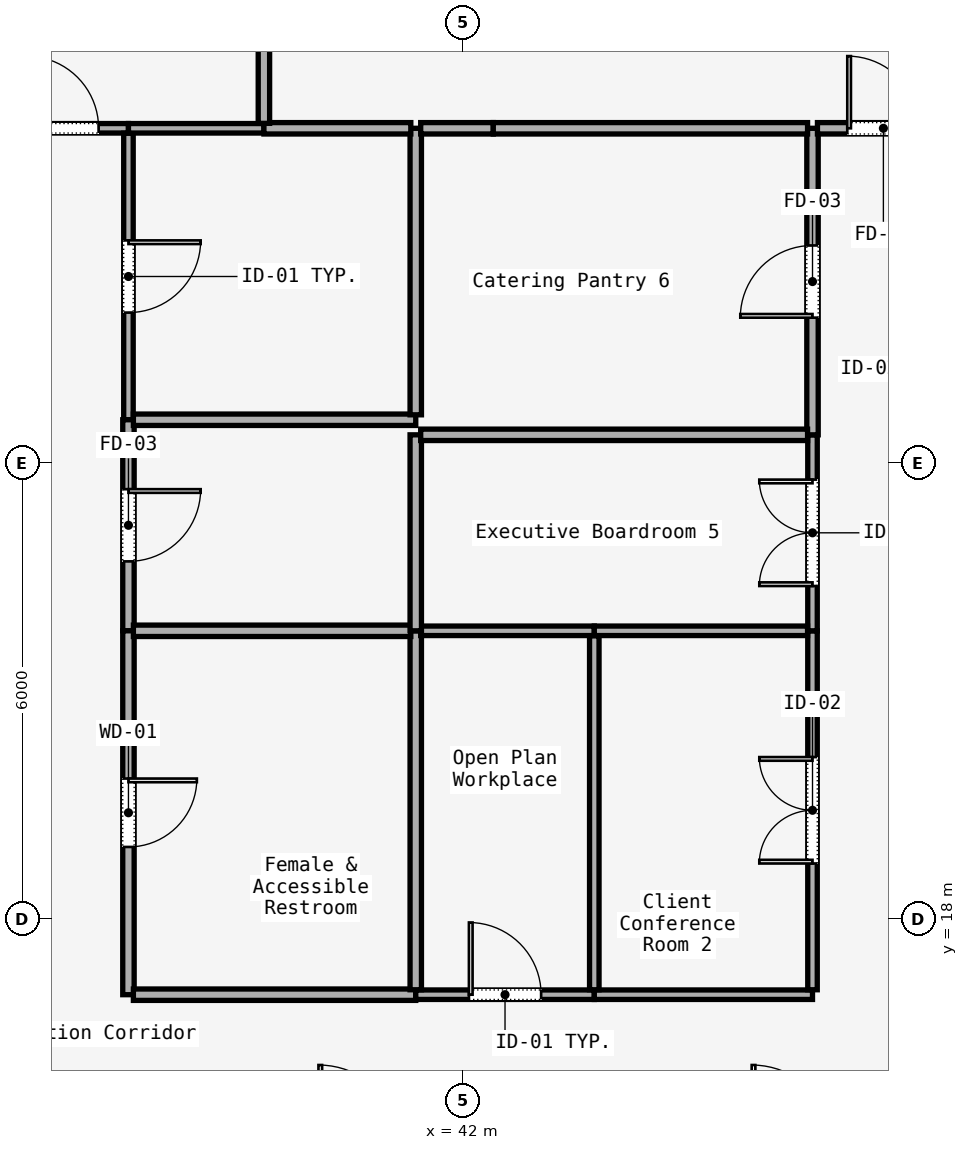
"""IFC4 building model, lengths in metres.
Left out: names, types, materials, properties, quantities, classifications, styles, units other than length and angle.
Written with IfcOpenShell. Run it as: python <this file> out.ifc"""

import sys

from ifc_helpers import new_model, si_unit, direction, frame, frame_2d, origin, place, context, subcontext, project, spatial, rectangle, extrude, element, fill, save


model = new_model("IFC4")
c1 = context("Model", 3, precision=1e-05, world=origin(), true_north=direction((0.0, 1.0)))
c2 = subcontext(c1, "Body", "Model", "MODEL_VIEW")
j1 = project(units=[si_unit("LENGTHUNIT", "METRE"), si_unit("PLANEANGLEUNIT", "RADIAN")], contexts=[c1])
p1 = place(None, origin())
s1 = spatial("IfcSite", under=j1, at=p1, CompositionType="ELEMENT")
p2 = place(p1, origin())
s2 = spatial("IfcBuilding", under=s1, at=p2, CompositionType="ELEMENT")
p3 = place(p2, frame((0.0, 0.0, 130.8)))
s3 = spatial("IfcBuildingStorey", under=s2, at=p3, CompositionType="ELEMENT", Elevation=130.8)
p4 = place(p3, frame((35.865, 28.4, 0.0), z_axis=(0.0, 0.0, 1.0), x_axis=(1.0, 0.0, 0.0)))
e1 = element("IfcWall", 1, at=p4, inside=s3, PredefinedType="PARTITIONING", context=c2, shape_type="SweptSolid", body=[
    extrude(rectangle(XDim=1.735, YDim=0.125, at=frame_2d((0.868, 0.0))), origin(), (0.0, 0.0, 1.0), 3.01),
])
p5 = place(p4, frame((0.393, 0.0, 0.0)))
e2 = element("IfcOpeningElement", 2, at=p5, cuts=e1, PredefinedType="OPENING", context=c2, shape_type="SweptSolid", body=[
    extrude(rectangle(XDim=0.95, YDim=2.2, at=frame_2d((0.475, 1.1))), frame((0.0, 0.062, 0.0), z_axis=(0.0, -1.0, 0.0), x_axis=(1.0, 0.0, 0.0)), (0.0, 0.0, 1.0), 0.125),
])
p6 = place(p3, frame((37.6, 28.335, 0.0), z_axis=(0.0, 0.0, 1.0), x_axis=(0.0, -1.0, 0.0)))
e3 = element("IfcWall", 3, at=p6, inside=s3, PredefinedType="PARTITIONING", context=c2, shape_type="SweptSolid", body=[
    extrude(rectangle(XDim=3.77, YDim=0.125, at=frame_2d((1.885, 0.0))), origin(), (0.0, 0.0, 1.0), 3.01),
])
p7 = place(p6, frame((1.41, 0.0, 0.0)))
e4 = element("IfcOpeningElement", 4, at=p7, cuts=e3, PredefinedType="OPENING", context=c2, shape_type="SweptSolid", body=[
    extrude(rectangle(XDim=0.95, YDim=2.2, at=frame_2d((0.475, 1.1))), frame((0.0, 0.062, 0.0), z_axis=(0.0, -1.0, 0.0), x_axis=(1.0, 0.0, 0.0)), (0.0, 0.0, 1.0), 0.125),
])
p8 = place(p3, frame((37.6, 24.565, 0.0), z_axis=(0.0, 0.0, 1.0), x_axis=(0.0, -1.0, 0.0)))
e5 = element("IfcWall", 5, at=p8, inside=s3, PredefinedType="PARTITIONING", context=c2, shape_type="SweptSolid", body=[
    extrude(rectangle(XDim=2.777, YDim=0.15, at=frame_2d((1.388, 0.0))), origin(), (0.0, 0.0, 1.0), 3.01),
])
p9 = place(p8, frame((0.914, 0.0, 0.0)))
e6 = element("IfcOpeningElement", 6, at=p9, cuts=e5, PredefinedType="OPENING", context=c2, shape_type="SweptSolid", body=[
    extrude(rectangle(XDim=0.95, YDim=2.2, at=frame_2d((0.475, 1.1))), frame((0.0, 0.075, 0.0), z_axis=(0.0, -1.0, 0.0), x_axis=(1.0, 0.0, 0.0)), (0.0, 0.0, 1.0), 0.15),
])
p10 = place(p3, frame((37.6, 21.788, 0.0), z_axis=(0.0, 0.0, 1.0), x_axis=(0.0, -1.0, 0.0)))
e7 = element("IfcWall", 7, at=p10, inside=s3, PredefinedType="PARTITIONING", context=c2, shape_type="SweptSolid", body=[
    extrude(rectangle(XDim=4.788, YDim=0.15, at=frame_2d((2.394, 0.0))), origin(), (0.0, 0.0, 1.0), 3.01),
])
p11 = place(p10, frame((1.944, 0.0, 0.0)))
e8 = element("IfcOpeningElement", 8, at=p11, cuts=e7, PredefinedType="OPENING", context=c2, shape_type="SweptSolid", body=[
    extrude(rectangle(XDim=0.9, YDim=2.15, at=frame_2d((0.45, 1.075))), frame((0.0, 0.075, 0.0), z_axis=(0.0, -1.0, 0.0), x_axis=(1.0, 0.0, 0.0)), (0.0, 0.0, 1.0), 0.15),
])
p12 = place(p3, frame((37.665, 17.0, 0.0), z_axis=(0.0, 0.0, 1.0), x_axis=(1.0, 0.0, 0.0)))
e9 = element("IfcWall", 9, at=p12, inside=s3, PredefinedType="PARTITIONING", context=c2, shape_type="SweptSolid", body=[
    extrude(rectangle(XDim=3.715, YDim=0.15, at=frame_2d((1.857, 0.0))), origin(), (0.0, 0.0, 1.0), 3.01),
])
p13 = place(p3, frame((41.38, 17.0, 0.0), z_axis=(0.0, 0.0, 1.0), x_axis=(1.0, 0.0, 0.0)))
e10 = element("IfcWall", 10, at=p13, inside=s3, PredefinedType="PARTITIONING", context=c2, shape_type="SweptSolid", body=[
    extrude(rectangle(XDim=2.349, YDim=0.125, at=frame_2d((1.175, 0.0))), origin(), (0.0, 0.0, 1.0), 3.01),
])
p14 = place(p13, frame((0.699, 0.0, 0.0)))
e11 = element("IfcOpeningElement", 11, at=p14, cuts=e10, PredefinedType="OPENING", context=c2, shape_type="SweptSolid", body=[
    extrude(rectangle(XDim=0.95, YDim=2.2, at=frame_2d((0.475, 1.1))), frame((0.0, 0.062, 0.0), z_axis=(0.0, -1.0, 0.0), x_axis=(1.0, 0.0, 0.0)), (0.0, 0.0, 1.0), 0.125),
])
p15 = place(p3, frame((43.729, 17.0, 0.0), z_axis=(0.0, 0.0, 1.0), x_axis=(1.0, 0.0, 0.0)))
e12 = element("IfcWall", 12, at=p15, inside=s3, PredefinedType="PARTITIONING", context=c2, shape_type="SweptSolid", body=[
    extrude(rectangle(XDim=2.871, YDim=0.125, at=frame_2d((1.436, 0.0))), origin(), (0.0, 0.0, 1.0), 3.01),
])
p16 = place(p3, frame((46.6, 17.065, 0.0), z_axis=(0.0, 0.0, 1.0), x_axis=(0.0, 1.0, 0.0)))
e13 = element("IfcWall", 13, at=p16, inside=s3, PredefinedType="PARTITIONING", context=c2, shape_type="SweptSolid", body=[
    extrude(rectangle(XDim=4.723, YDim=0.125, at=frame_2d((2.362, 0.0))), origin(), (0.0, 0.0, 1.0), 3.01),
])
p17 = place(p16, frame((1.662, 0.0, 0.0)))
e14 = element("IfcOpeningElement", 14, at=p17, cuts=e13, PredefinedType="OPENING", context=c2, shape_type="SweptSolid", body=[
    extrude(rectangle(XDim=1.4, YDim=2.2, at=frame_2d((0.7, 1.1))), frame((0.0, 0.062, 0.0), z_axis=(0.0, -1.0, 0.0), x_axis=(1.0, 0.0, 0.0)), (0.0, 0.0, 1.0), 0.125),
])
p18 = place(p3, frame((46.6, 21.788, 0.0), z_axis=(0.0, 0.0, 1.0), x_axis=(0.0, 1.0, 0.0)))
e15 = element("IfcWall", 15, at=p18, inside=s3, PredefinedType="PARTITIONING", context=c2, shape_type="SweptSolid", body=[
    extrude(rectangle(XDim=2.579, YDim=0.125, at=frame_2d((1.289, 0.0))), origin(), (0.0, 0.0, 1.0), 3.01),
])
p19 = place(p18, frame((0.589, 0.0, 0.0)))
e16 = element("IfcOpeningElement", 16, at=p19, cuts=e15, PredefinedType="OPENING", context=c2, shape_type="SweptSolid", body=[
    extrude(rectangle(XDim=1.4, YDim=2.2, at=frame_2d((0.7, 1.1))), frame((0.0, 0.062, 0.0), z_axis=(0.0, -1.0, 0.0), x_axis=(1.0, 0.0, 0.0)), (0.0, 0.0, 1.0), 0.125),
])
p20 = place(p3, frame((46.6, 24.367, 0.0), z_axis=(0.0, 0.0, 1.0), x_axis=(0.0, 1.0, 0.0)))
e17 = element("IfcWall", 17, at=p20, inside=s3, PredefinedType="PARTITIONING", context=c2, shape_type="SweptSolid", body=[
    extrude(rectangle(XDim=4.033, YDim=0.15, at=frame_2d((2.017, 0.0))), origin(), (0.0, 0.0, 1.0), 3.01),
])
p21 = place(p20, frame((1.542, 0.0, 0.0)))
e18 = element("IfcOpeningElement", 18, at=p21, cuts=e17, PredefinedType="OPENING", context=c2, shape_type="SweptSolid", body=[
    extrude(rectangle(XDim=0.95, YDim=2.2, at=frame_2d((0.475, 1.1))), frame((0.0, 0.075, 0.0), z_axis=(0.0, -1.0, 0.0), x_axis=(1.0, 0.0, 0.0)), (0.0, 0.0, 1.0), 0.15),
])
p22 = place(p3, frame((46.665, 28.4, 0.0), z_axis=(0.0, 0.0, 1.0), x_axis=(1.0, 0.0, 0.0)))
e19 = element("IfcWall", 19, at=p22, inside=s3, PredefinedType="PARTITIONING", context=c2, shape_type="SweptSolid", body=[
    extrude(rectangle(XDim=1.735, YDim=0.15, at=frame_2d((0.867, 0.0))), origin(), (0.0, 0.0, 1.0), 3.01),
])
p23 = place(p22, frame((0.393, 0.0, 0.0)))
e20 = element("IfcOpeningElement", 20, at=p23, cuts=e19, PredefinedType="OPENING", context=c2, shape_type="SweptSolid", body=[
    extrude(rectangle(XDim=0.95, YDim=2.2, at=frame_2d((0.475, 1.1))), frame((0.0, 0.075, 0.0), z_axis=(0.0, -1.0, 0.0), x_axis=(1.0, 0.0, 0.0)), (0.0, 0.0, 1.0), 0.15),
])
p24 = place(p3, frame((41.38, 21.788, 0.0), z_axis=(0.0, 0.0, 1.0), x_axis=(0.0, -1.0, 0.0)))
e21 = element("IfcWall", 21, at=p24, inside=s3, PredefinedType="PARTITIONING", context=c2, shape_type="SweptSolid", body=[
    extrude(rectangle(XDim=4.723, YDim=0.15, at=frame_2d((2.362, 0.0))), origin(), (0.0, 0.0, 1.0), 3.01),
])
p25 = place(p3, frame((37.665, 21.788, 0.0), z_axis=(0.0, 0.0, 1.0), x_axis=(1.0, 0.0, 0.0)))
e22 = element("IfcWall", 22, at=p25, inside=s3, PredefinedType="PARTITIONING", context=c2, shape_type="SweptSolid", body=[
    extrude(rectangle(XDim=3.65, YDim=0.15, at=frame_2d((1.825, 0.0))), origin(), (0.0, 0.0, 1.0), 3.01),
])
p26 = place(p3, frame((41.445, 21.788, 0.0), z_axis=(0.0, 0.0, 1.0), x_axis=(1.0, 0.0, 0.0)))
e23 = element("IfcWall", 23, at=p26, inside=s3, PredefinedType="PARTITIONING", context=c2, shape_type="SweptSolid", body=[
    extrude(rectangle(XDim=2.284, YDim=0.125, at=frame_2d((1.142, 0.0))), origin(), (0.0, 0.0, 1.0), 3.01),
])
p27 = place(p3, frame((43.729, 21.723, 0.0), z_axis=(0.0, 0.0, 1.0), x_axis=(0.0, -1.0, 0.0)))
e24 = element("IfcWall", 24, at=p27, inside=s3, PredefinedType="PARTITIONING", context=c2, shape_type="SweptSolid", body=[
    extrude(rectangle(XDim=4.658, YDim=0.125, at=frame_2d((2.329, 0.0))), origin(), (0.0, 0.0, 1.0), 3.01),
])
p28 = place(p3, frame((43.729, 21.788, 0.0), z_axis=(0.0, 0.0, 1.0), x_axis=(1.0, 0.0, 0.0)))
e25 = element("IfcWall", 25, at=p28, inside=s3, PredefinedType="PARTITIONING", context=c2, shape_type="SweptSolid", body=[
    extrude(rectangle(XDim=2.806, YDim=0.125, at=frame_2d((1.403, 0.0))), origin(), (0.0, 0.0, 1.0), 3.01),
])
p29 = place(p3, frame((41.38, 21.788, 0.0), z_axis=(0.0, 0.0, 1.0), x_axis=(0.0, 1.0, 0.0)))
e26 = element("IfcWall", 26, at=p29, inside=s3, PredefinedType="PARTITIONING", context=c2, shape_type="SweptSolid", body=[
    extrude(rectangle(XDim=2.579, YDim=0.15, at=frame_2d((1.289, 0.0))), origin(), (0.0, 0.0, 1.0), 3.01),
])
p30 = place(p3, frame((41.445, 24.367, 0.0), z_axis=(0.0, 0.0, 1.0), x_axis=(1.0, 0.0, 0.0)))
e27 = element("IfcWall", 27, at=p30, inside=s3, PredefinedType="PARTITIONING", context=c2, shape_type="SweptSolid", body=[
    extrude(rectangle(XDim=5.09, YDim=0.15, at=frame_2d((2.545, 0.0))), origin(), (0.0, 0.0, 1.0), 3.01),
])
p31 = place(p3, frame((37.665, 24.565, 0.0), z_axis=(0.0, 0.0, 1.0), x_axis=(1.0, 0.0, 0.0)))
e28 = element("IfcWall", 28, at=p31, inside=s3, PredefinedType="PARTITIONING", context=c2, shape_type="SweptSolid", body=[
    extrude(rectangle(XDim=3.715, YDim=0.15, at=frame_2d((1.857, 0.0))), origin(), (0.0, 0.0, 1.0), 3.01),
])
p32 = place(p3, frame((41.38, 24.63, 0.0), z_axis=(0.0, 0.0, 1.0), x_axis=(0.0, 1.0, 0.0)))
e29 = element("IfcWall", 29, at=p32, inside=s3, PredefinedType="PARTITIONING", context=c2, shape_type="SweptSolid", body=[
    extrude(rectangle(XDim=3.77, YDim=0.15, at=frame_2d((1.885, 0.0))), origin(), (0.0, 0.0, 1.0), 3.01),
])
p33 = place(p3, frame((41.445, 28.4, 0.0), z_axis=(0.0, 0.0, 1.0), x_axis=(1.0, 0.0, 0.0)))
e30 = element("IfcWall", 30, at=p33, inside=s3, PredefinedType="PARTITIONING", context=c2, shape_type="SweptSolid", body=[
    extrude(rectangle(XDim=0.955, YDim=0.15, at=frame_2d((0.478, 0.0))), origin(), (0.0, 0.0, 1.0), 3.01),
])
p34 = place(p3, frame((42.4, 28.4, 0.0), z_axis=(0.0, 0.0, 1.0), x_axis=(1.0, 0.0, 0.0)))
e31 = element("IfcWall", 31, at=p34, inside=s3, PredefinedType="PARTITIONING", context=c2, shape_type="SweptSolid", body=[
    extrude(rectangle(XDim=4.135, YDim=0.15, at=frame_2d((2.067, 0.0))), origin(), (0.0, 0.0, 1.0), 3.01),
])
p35 = place(p3, frame((37.6, 28.4, 0.0), z_axis=(0.0, 0.0, 1.0), x_axis=(1.0, 0.0, 0.0)))
e32 = element("IfcWall", 32, at=p35, inside=s3, PredefinedType="PARTITIONING", context=c2, shape_type="SweptSolid", body=[
    extrude(rectangle(XDim=1.782, YDim=0.125, at=frame_2d((0.891, 0.0))), origin(), (0.0, 0.0, 1.0), 3.01),
])
p36 = place(p3, frame((39.382, 28.4, 0.0), z_axis=(0.0, 0.0, 1.0), x_axis=(1.0, 0.0, 0.0)))
e33 = element("IfcWall", 33, at=p36, inside=s3, PredefinedType="PARTITIONING", context=c2, shape_type="SweptSolid", body=[
    extrude(rectangle(XDim=1.933, YDim=0.15, at=frame_2d((0.966, 0.0))), origin(), (0.0, 0.0, 1.0), 3.01),
])
p37 = place(p3, frame((39.382, 46.056, 0.0), z_axis=(0.0, 0.0, 1.0), x_axis=(0.0, -1.0, 0.0)))
e34 = element("IfcWall", 34, at=p37, inside=s3, PredefinedType="PARTITIONING", context=c2, shape_type="SweptSolid", body=[
    extrude(rectangle(XDim=17.591, YDim=0.15, at=frame_2d((8.795, 0.0))), origin(), (0.0, 0.0, 1.0), 3.01),
])
p38 = place(p11, origin())
e35 = element("IfcDoor", 35, at=p38, inside=s3, OperationType="SINGLE_SWING_LEFT", PredefinedType="DOOR", context=c2, shape_type="SweptSolid", body=[
    extrude(rectangle(XDim=0.9, YDim=2.15, at=frame_2d((0.45, 1.075))), frame((0.0, 0.025, 0.0), z_axis=(0.0, -1.0, 0.0), x_axis=(1.0, 0.0, 0.0)), (0.0, 0.0, 1.0), 0.05),
])
fill(e8, e35)
p39 = place(p14, origin())
e36 = element("IfcDoor", 36, at=p39, inside=s3, OperationType="SINGLE_SWING_RIGHT", PredefinedType="DOOR", context=c2, shape_type="SweptSolid", body=[
    extrude(rectangle(XDim=0.95, YDim=2.2, at=frame_2d((0.475, 1.1))), frame((0.0, 0.025, 0.0), z_axis=(0.0, -1.0, 0.0), x_axis=(1.0, 0.0, 0.0)), (0.0, 0.0, 1.0), 0.05),
])
fill(e11, e36)
p40 = place(p17, origin())
e37 = element("IfcDoor", 37, at=p40, inside=s3, OperationType="SINGLE_SWING_LEFT", PredefinedType="DOOR", context=c2, shape_type="SweptSolid", body=[
    extrude(rectangle(XDim=1.4, YDim=2.2, at=frame_2d((0.7, 1.1))), frame((0.0, 0.025, 0.0), z_axis=(0.0, -1.0, 0.0), x_axis=(1.0, 0.0, 0.0)), (0.0, 0.0, 1.0), 0.05),
])
fill(e14, e37)
p41 = place(p19, origin())
e38 = element("IfcDoor", 38, at=p41, inside=s3, OperationType="SINGLE_SWING_LEFT", PredefinedType="DOOR", context=c2, shape_type="SweptSolid", body=[
    extrude(rectangle(XDim=1.4, YDim=2.2, at=frame_2d((0.7, 1.1))), frame((0.0, 0.025, 0.0), z_axis=(0.0, -1.0, 0.0), x_axis=(1.0, 0.0, 0.0)), (0.0, 0.0, 1.0), 0.05),
])
fill(e16, e38)
p42 = place(p9, origin())
e39 = element("IfcDoor", 39, at=p42, inside=s3, OperationType="SINGLE_SWING_RIGHT", PredefinedType="DOOR", context=c2, shape_type="SweptSolid", body=[
    extrude(rectangle(XDim=0.95, YDim=2.2, at=frame_2d((0.475, 1.1))), frame((0.0, 0.025, 0.0), z_axis=(0.0, -1.0, 0.0), x_axis=(1.0, 0.0, 0.0)), (0.0, 0.0, 1.0), 0.05),
])
fill(e6, e39)
p43 = place(p21, origin())
e40 = element("IfcDoor", 40, at=p43, inside=s3, OperationType="SINGLE_SWING_RIGHT", PredefinedType="DOOR", context=c2, shape_type="SweptSolid", body=[
    extrude(rectangle(XDim=0.95, YDim=2.2, at=frame_2d((0.475, 1.1))), frame((0.0, 0.025, 0.0), z_axis=(0.0, -1.0, 0.0), x_axis=(1.0, 0.0, 0.0)), (0.0, 0.0, 1.0), 0.05),
])
fill(e18, e40)
p44 = place(p7, origin())
e41 = element("IfcDoor", 41, at=p44, inside=s3, OperationType="SINGLE_SWING_LEFT", PredefinedType="DOOR", context=c2, shape_type="SweptSolid", body=[
    extrude(rectangle(XDim=0.95, YDim=2.2, at=frame_2d((0.475, 1.1))), frame((0.0, 0.025, 0.0), z_axis=(0.0, -1.0, 0.0), x_axis=(1.0, 0.0, 0.0)), (0.0, 0.0, 1.0), 0.05),
])
fill(e4, e41)
p45 = place(p5, origin())
e42 = element("IfcDoor", 42, at=p45, inside=s3, OperationType="SINGLE_SWING_LEFT", PredefinedType="DOOR", context=c2, shape_type="SweptSolid", body=[
    extrude(rectangle(XDim=0.95, YDim=2.2, at=frame_2d((0.475, 1.1))), frame((0.0, 0.025, 0.0), z_axis=(0.0, -1.0, 0.0), x_axis=(1.0, 0.0, 0.0)), (0.0, 0.0, 1.0), 0.05),
])
fill(e2, e42)
p46 = place(p23, origin())
e43 = element("IfcDoor", 43, at=p46, inside=s3, OperationType="SINGLE_SWING_RIGHT", PredefinedType="DOOR", context=c2, shape_type="SweptSolid", body=[
    extrude(rectangle(XDim=0.95, YDim=2.2, at=frame_2d((0.475, 1.1))), frame((0.0, 0.025, 0.0), z_axis=(0.0, -1.0, 0.0), x_axis=(1.0, 0.0, 0.0)), (0.0, 0.0, 1.0), 0.05),
])
fill(e20, e43)
save(model, sys.argv[1])
